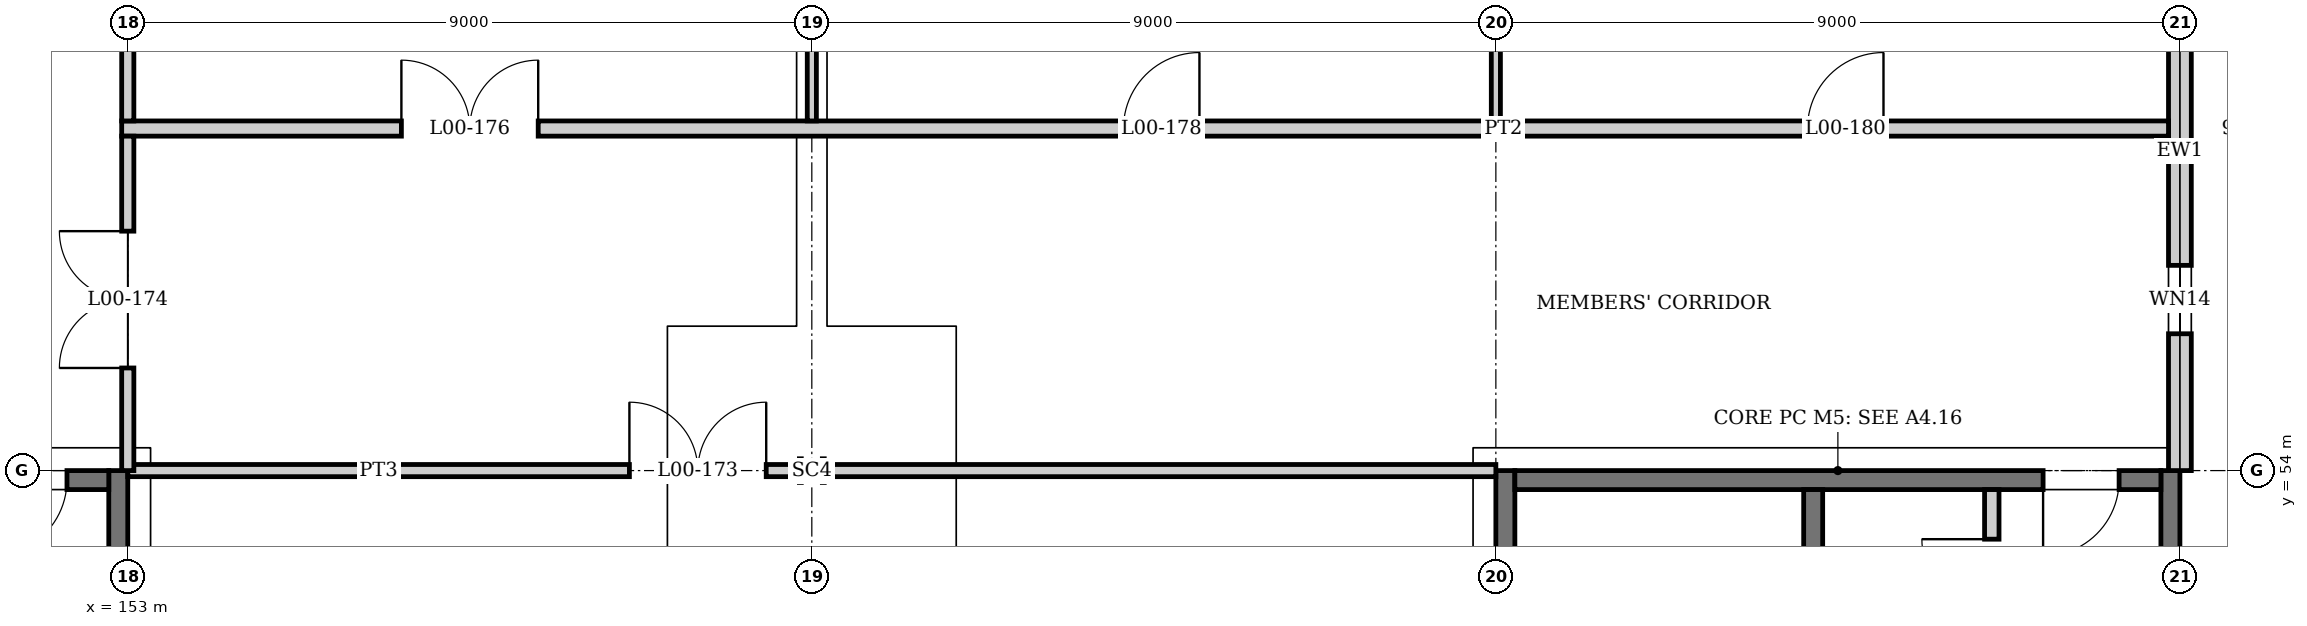
"""IFC4 building model, lengths in metres.
Left out: names, types, materials, properties, quantities, classifications, styles, units other than length and angle.
Written with IfcOpenShell. Run it as: python <this file> out.ifc"""

import sys

from ifc_helpers import new_model, si_unit, direction, frame, frame_2d, origin, origin_2d, place, context, subcontext, project, spatial, rectangle, i_section, extrude, element, fill, save


model = new_model("IFC4")
c1 = context("Model", 3, precision=1e-05, world=origin(), true_north=direction((0.0, 1.0)))
c2 = subcontext(c1, "Body", "Model", "MODEL_VIEW")
j1 = project(units=[si_unit("LENGTHUNIT", "METRE"), si_unit("PLANEANGLEUNIT", "RADIAN")], contexts=[c1])
p1 = place(None, origin())
s1 = spatial("IfcSite", under=j1, at=p1, CompositionType="ELEMENT")
p2 = place(p1, origin())
s2 = spatial("IfcBuilding", under=s1, at=p2, CompositionType="ELEMENT")
p3 = place(p2, origin())
s3 = spatial("IfcBuildingStorey", under=s2, at=p3, CompositionType="ELEMENT", Elevation=0.0)
p4 = place(p3, frame((162.0, 54.0, 0.0), z_axis=(0.0, 0.0, 1.0), x_axis=(0.0, 1.0, 0.0)))
e1 = element("IfcColumn", 1, at=p4, inside=s3, PredefinedType="COLUMN", context=c2, shape_type="SweptSolid", body=[
    extrude(i_section(OverallWidth=0.311, OverallDepth=0.327, WebThickness=0.016, FlangeThickness=0.025, at=origin_2d()), origin(), (0.0, 0.0, 1.0), 6.0),
])
p5 = place(p3, frame((152.875, 45.0, 0.0), z_axis=(0.0, 0.0, 1.0), x_axis=(0.0, 1.0, 0.0)))
e2 = element("IfcWall", 2, at=p5, inside=s3, PredefinedType="SHEAR", context=c2, shape_type="SweptSolid", body=[
    extrude(rectangle(XDim=9.0, YDim=0.25, at=frame_2d((4.5, 0.0))), origin(), (0.0, 0.0, 1.0), 6.0),
])
p6 = place(p3, frame((144.25, 53.875, 0.0), z_axis=(0.0, 0.0, 1.0), x_axis=(1.0, 0.0, 0.0)))
e3 = element("IfcWall", 3, at=p6, inside=s3, PredefinedType="SHEAR", context=c2, shape_type="SweptSolid", body=[
    extrude(rectangle(XDim=8.5, YDim=0.25, at=frame_2d((4.25, 0.0))), origin(), (0.0, 0.0, 1.0), 6.0),
])
p7 = place(p6, frame((6.95, 0.0, 0.0)))
e4 = element("IfcOpeningElement", 4, at=p7, cuts=e3, PredefinedType="OPENING", context=c2, shape_type="SweptSolid", body=[
    extrude(rectangle(XDim=1.0, YDim=2.1, at=frame_2d((0.5, 1.05))), frame((0.0, 0.135, 0.0), z_axis=(0.0, -1.0, 0.0), x_axis=(1.0, 0.0, 0.0)), (0.0, 0.0, 1.0), 0.27),
])
for number, where, z_axis, x_axis in (
    (5, (171.125, 45.0, 0.0), (0.0, 0.0, 1.0), (0.0, 1.0, 0.0)),
    (6, (179.875, 45.0, 0.0), (0.0, 0.0, 1.0), (0.0, 1.0, 0.0)),
):
    element("IfcWall", number, at=place(p3, frame(where, z_axis=z_axis, x_axis=x_axis)), inside=s3, PredefinedType="SHEAR", context=c2, shape_type="SweptSolid", body=[
        extrude(rectangle(XDim=9.0, YDim=0.25, at=frame_2d((4.5, 0.0))), origin(), (0.0, 0.0, 1.0), 6.0),
    ])
p8 = place(p3, frame((171.25, 53.875, 0.0), z_axis=(0.0, 0.0, 1.0), x_axis=(1.0, 0.0, 0.0)))
e7 = element("IfcWall", 7, at=p8, inside=s3, PredefinedType="SHEAR", context=c2, shape_type="SweptSolid", body=[
    extrude(rectangle(XDim=8.5, YDim=0.25, at=frame_2d((4.25, 0.0))), origin(), (0.0, 0.0, 1.0), 6.0),
])
p9 = place(p8, frame((6.95, 0.0, 0.0)))
e8 = element("IfcOpeningElement", 8, at=p9, cuts=e7, PredefinedType="OPENING", context=c2, shape_type="SweptSolid", body=[
    extrude(rectangle(XDim=1.0, YDim=2.1, at=frame_2d((0.5, 1.05))), frame((0.0, 0.135, 0.0), z_axis=(0.0, -1.0, 0.0), x_axis=(1.0, 0.0, 0.0)), (0.0, 0.0, 1.0), 0.27),
])
p10 = place(p3, frame((180.0, 54.0, 0.0), z_axis=(0.0, 0.0, 1.0), x_axis=(0.0, 1.0, 0.0)))
e9 = element("IfcWall", 9, at=p10, inside=s3, PredefinedType="SOLIDWALL", context=c2, shape_type="SweptSolid", body=[
    extrude(rectangle(XDim=8.846, YDim=0.3, at=frame_2d((4.423, 0.0))), origin(), (0.0, 0.0, 1.0), 5.444),
])
p11 = place(p10, frame((1.8, 0.0, 0.6)))
e10 = element("IfcOpeningElement", 10, at=p11, cuts=e9, PredefinedType="OPENING", context=c2, shape_type="SweptSolid", body=[
    extrude(rectangle(XDim=0.9, YDim=2.7, at=frame_2d((0.45, 1.35))), frame((0.0, 0.16, 0.0), z_axis=(0.0, -1.0, 0.0), x_axis=(1.0, 0.0, 0.0)), (0.0, 0.0, 1.0), 0.32),
])
p12 = place(p10, frame((5.7, 0.0, 1.2)))
e11 = element("IfcOpeningElement", 11, at=p12, cuts=e9, PredefinedType="OPENING", context=c2, shape_type="SweptSolid", body=[
    extrude(rectangle(XDim=2.1, YDim=1.2, at=frame_2d((1.05, 0.6))), frame((0.0, 0.16, 0.0), z_axis=(0.0, -1.0, 0.0), x_axis=(1.0, 0.0, 0.0)), (0.0, 0.0, 1.0), 0.32),
])
p13 = place(p3, frame((175.175, 45.25, 0.0), z_axis=(0.0, 0.0, 1.0), x_axis=(0.0, 1.0, 0.0)))
e12 = element("IfcWall", 12, at=p13, inside=s3, PredefinedType="SOLIDWALL", context=c2, shape_type="SweptSolid", body=[
    extrude(rectangle(XDim=8.5, YDim=0.25, at=frame_2d((4.25, 0.0))), origin(), (0.0, 0.0, 1.0), 5.75),
])
p14 = place(p13, frame((0.4, 0.0, 0.0)))
e13 = element("IfcOpeningElement", 13, at=p14, cuts=e12, PredefinedType="OPENING", context=c2, shape_type="SweptSolid", body=[
    extrude(rectangle(XDim=1.0, YDim=2.1, at=frame_2d((0.5, 1.05))), frame((0.0, 0.135, 0.0), z_axis=(0.0, -1.0, 0.0), x_axis=(1.0, 0.0, 0.0)), (0.0, 0.0, 1.0), 0.27),
])
p15 = place(p3, frame((153.0, 54.0, 0.0), z_axis=(0.0, 0.0, 1.0), x_axis=(1.0, 0.0, 0.0)))
e14 = element("IfcWall", 14, at=p15, inside=s3, PredefinedType="PARTITIONING", context=c2, shape_type="SweptSolid", body=[
    extrude(rectangle(XDim=8.836, YDim=0.16, at=frame_2d((4.418, 0.0))), origin(), (0.0, 0.0, 1.0), 5.322),
])
p16 = place(p15, frame((6.6, 0.0, 0.0)))
e15 = element("IfcOpeningElement", 15, at=p16, cuts=e14, PredefinedType="OPENING", context=c2, shape_type="SweptSolid", body=[
    extrude(rectangle(XDim=1.8, YDim=2.1, at=frame_2d((0.9, 1.05))), frame((0.0, 0.09, 0.0), z_axis=(0.0, -1.0, 0.0), x_axis=(1.0, 0.0, 0.0)), (0.0, 0.0, 1.0), 0.18),
])
p17 = place(p3, frame((162.164, 54.0, 0.0), z_axis=(0.0, 0.0, 1.0), x_axis=(1.0, 0.0, 0.0)))
e16 = element("IfcWall", 16, at=p17, inside=s3, PredefinedType="PARTITIONING", context=c2, shape_type="SweptSolid", body=[
    extrude(rectangle(XDim=8.836, YDim=0.16, at=frame_2d((4.418, 0.0))), origin(), (0.0, 0.0, 1.0), 5.322),
])
p18 = place(p3, frame((152.92, 58.5, 0.0), z_axis=(0.0, 0.0, 1.0), x_axis=(1.0, 0.0, 0.0)))
e17 = element("IfcWall", 17, at=p18, inside=s3, PredefinedType="PARTITIONING", context=c2, shape_type="SweptSolid", body=[
    extrude(rectangle(XDim=26.93, YDim=0.2, at=frame_2d((13.465, 0.0))), origin(), (0.0, 0.0, 1.0), 5.447),
])
p19 = place(p18, frame((3.68, 0.0, 0.0)))
e18 = element("IfcOpeningElement", 18, at=p19, cuts=e17, PredefinedType="OPENING", context=c2, shape_type="SweptSolid", body=[
    extrude(rectangle(XDim=1.8, YDim=2.1, at=frame_2d((0.9, 1.05))), frame((0.0, 0.11, 0.0), z_axis=(0.0, -1.0, 0.0), x_axis=(1.0, 0.0, 0.0)), (0.0, 0.0, 1.0), 0.22),
])
p20 = place(p18, frame((13.18, 0.0, 0.0)))
e19 = element("IfcOpeningElement", 19, at=p20, cuts=e17, PredefinedType="OPENING", context=c2, shape_type="SweptSolid", body=[
    extrude(rectangle(XDim=1.0, YDim=2.1, at=frame_2d((0.5, 1.05))), frame((0.0, 0.11, 0.0), z_axis=(0.0, -1.0, 0.0), x_axis=(1.0, 0.0, 0.0)), (0.0, 0.0, 1.0), 0.22),
])
p21 = place(p18, frame((22.18, 0.0, 0.0)))
e20 = element("IfcOpeningElement", 20, at=p21, cuts=e17, PredefinedType="OPENING", context=c2, shape_type="SweptSolid", body=[
    extrude(rectangle(XDim=1.0, YDim=2.1, at=frame_2d((0.5, 1.05))), frame((0.0, 0.11, 0.0), z_axis=(0.0, -1.0, 0.0), x_axis=(1.0, 0.0, 0.0)), (0.0, 0.0, 1.0), 0.22),
])
p22 = place(p3, frame((153.0, 54.0, 0.0), z_axis=(0.0, 0.0, 1.0), x_axis=(0.0, 1.0, 0.0)))
e21 = element("IfcWall", 21, at=p22, inside=s3, PredefinedType="PARTITIONING", context=c2, shape_type="SweptSolid", body=[
    extrude(rectangle(XDim=4.4, YDim=0.16, at=frame_2d((2.2, 0.0))), origin(), (0.0, 0.0, 1.0), 5.322),
])
p23 = place(p22, frame((1.35, 0.0, 0.0)))
e22 = element("IfcOpeningElement", 22, at=p23, cuts=e21, PredefinedType="OPENING", context=c2, shape_type="SweptSolid", body=[
    extrude(rectangle(XDim=1.8, YDim=2.1, at=frame_2d((0.9, 1.05))), frame((0.0, 0.09, 0.0), z_axis=(0.0, -1.0, 0.0), x_axis=(1.0, 0.0, 0.0)), (0.0, 0.0, 1.0), 0.18),
])
p24 = place(p3, frame((153.0, 58.6, 0.0), z_axis=(0.0, 0.0, 1.0), x_axis=(0.0, 1.0, 0.0)))
e23 = element("IfcWall", 23, at=p24, inside=s3, PredefinedType="PARTITIONING", context=c2, shape_type="SweptSolid", body=[
    extrude(rectangle(XDim=4.236, YDim=0.16, at=frame_2d((2.118, 0.0))), origin(), (0.0, 0.0, 1.0), 5.447),
])
for number, where, z_axis, x_axis in (
    (24, (162.0, 58.6, 0.0), (0.0, 0.0, 1.0), (0.0, 1.0, 0.0)),
    (25, (171.0, 58.6, 0.0), (0.0, 0.0, 1.0), (0.0, 1.0, 0.0)),
):
    element("IfcWall", number, at=place(p3, frame(where, z_axis=z_axis, x_axis=x_axis)), inside=s3, PredefinedType="PARTITIONING", context=c2, shape_type="SweptSolid", body=[
        extrude(rectangle(XDim=4.236, YDim=0.12, at=frame_2d((2.118, 0.0))), origin(), (0.0, 0.0, 1.0), 5.447),
    ])
p25 = place(p3, frame((177.525, 51.4, 0.0), z_axis=(0.0, 0.0, 1.0), x_axis=(0.0, 1.0, 0.0)))
e26 = element("IfcWall", 26, at=p25, inside=s3, PredefinedType="PARTITIONING", context=c2, shape_type="SweptSolid", body=[
    extrude(rectangle(XDim=2.35, YDim=0.19, at=frame_2d((1.175, 0.0))), origin(), (0.0, 0.0, 1.0), 5.75),
])
p26 = place(p25, frame((0.778, 0.0, 0.0)))
e27 = element("IfcOpeningElement", 27, at=p26, cuts=e26, PredefinedType="OPENING", context=c2, shape_type="SweptSolid", body=[
    extrude(rectangle(XDim=0.92, YDim=2.1, at=frame_2d((0.46, 1.05))), frame((0.0, 0.105, 0.0), z_axis=(0.0, -1.0, 0.0), x_axis=(1.0, 0.0, 0.0)), (0.0, 0.0, 1.0), 0.21),
])
p27 = place(p11, origin())
e28 = element("IfcWindow", 28, at=p27, inside=s3, PartitioningType="SINGLE_PANEL", PredefinedType="WINDOW", context=c2, shape_type="SweptSolid", body=[
    extrude(rectangle(XDim=0.9, YDim=2.7, at=frame_2d((0.45, 1.35))), frame((0.0, 0.03, 0.0), z_axis=(0.0, -1.0, 0.0), x_axis=(1.0, 0.0, 0.0)), (0.0, 0.0, 1.0), 0.06),
])
fill(e10, e28)
p28 = place(p7, frame((1.0, 0.0, 0.0), z_axis=(0.0, 0.0, 1.0), x_axis=(-1.0, 0.0, 0.0)))
e29 = element("IfcDoor", 29, at=p28, inside=s3, OperationType="SINGLE_SWING_RIGHT", PredefinedType="DOOR", context=c2, shape_type="SweptSolid", body=[
    extrude(rectangle(XDim=1.0, YDim=2.1, at=frame_2d((0.5, 1.05))), frame((0.0, 0.025, 0.0), z_axis=(0.0, -1.0, 0.0), x_axis=(1.0, 0.0, 0.0)), (0.0, 0.0, 1.0), 0.05),
])
fill(e4, e29)
p29 = place(p9, frame((1.0, 0.0, 0.0), z_axis=(0.0, 0.0, 1.0), x_axis=(-1.0, 0.0, 0.0)))
e30 = element("IfcDoor", 30, at=p29, inside=s3, OperationType="SINGLE_SWING_RIGHT", PredefinedType="DOOR", context=c2, shape_type="SweptSolid", body=[
    extrude(rectangle(XDim=1.0, YDim=2.1, at=frame_2d((0.5, 1.05))), frame((0.0, 0.025, 0.0), z_axis=(0.0, -1.0, 0.0), x_axis=(1.0, 0.0, 0.0)), (0.0, 0.0, 1.0), 0.05),
])
fill(e8, e30)
p30 = place(p26, origin())
e31 = element("IfcDoor", 31, at=p30, inside=s3, OperationType="SINGLE_SWING_RIGHT", PredefinedType="DOOR", context=c2, shape_type="SweptSolid", body=[
    extrude(rectangle(XDim=0.92, YDim=2.1, at=frame_2d((0.46, 1.05))), frame((0.0, 0.025, 0.0), z_axis=(0.0, -1.0, 0.0), x_axis=(1.0, 0.0, 0.0)), (0.0, 0.0, 1.0), 0.05),
])
fill(e27, e31)
p31 = place(p16, origin())
e32 = element("IfcDoor", 32, at=p31, inside=s3, OperationType="DOUBLE_DOOR_SINGLE_SWING", PredefinedType="DOOR", context=c2, shape_type="SweptSolid", body=[
    extrude(rectangle(XDim=1.8, YDim=2.1, at=frame_2d((0.9, 1.05))), frame((0.0, 0.025, 0.0), z_axis=(0.0, -1.0, 0.0), x_axis=(1.0, 0.0, 0.0)), (0.0, 0.0, 1.0), 0.05),
])
fill(e15, e32)
p32 = place(p23, origin())
e33 = element("IfcDoor", 33, at=p32, inside=s3, OperationType="DOUBLE_DOOR_SINGLE_SWING", PredefinedType="DOOR", context=c2, shape_type="SweptSolid", body=[
    extrude(rectangle(XDim=1.8, YDim=2.1, at=frame_2d((0.9, 1.05))), frame((0.0, 0.025, 0.0), z_axis=(0.0, -1.0, 0.0), x_axis=(1.0, 0.0, 0.0)), (0.0, 0.0, 1.0), 0.05),
])
fill(e22, e33)
p33 = place(p19, origin())
e34 = element("IfcDoor", 34, at=p33, inside=s3, OperationType="DOUBLE_DOOR_SINGLE_SWING", PredefinedType="DOOR", context=c2, shape_type="SweptSolid", body=[
    extrude(rectangle(XDim=1.8, YDim=2.1, at=frame_2d((0.9, 1.05))), frame((0.0, 0.025, 0.0), z_axis=(0.0, -1.0, 0.0), x_axis=(1.0, 0.0, 0.0)), (0.0, 0.0, 1.0), 0.05),
])
fill(e18, e34)
p34 = place(p20, origin())
e35 = element("IfcDoor", 35, at=p34, inside=s3, OperationType="SINGLE_SWING_RIGHT", PredefinedType="DOOR", context=c2, shape_type="SweptSolid", body=[
    extrude(rectangle(XDim=1.0, YDim=2.1, at=frame_2d((0.5, 1.05))), frame((0.0, 0.025, 0.0), z_axis=(0.0, -1.0, 0.0), x_axis=(1.0, 0.0, 0.0)), (0.0, 0.0, 1.0), 0.05),
])
fill(e19, e35)
p35 = place(p21, origin())
e36 = element("IfcDoor", 36, at=p35, inside=s3, OperationType="SINGLE_SWING_RIGHT", PredefinedType="DOOR", context=c2, shape_type="SweptSolid", body=[
    extrude(rectangle(XDim=1.0, YDim=2.1, at=frame_2d((0.5, 1.05))), frame((0.0, 0.025, 0.0), z_axis=(0.0, -1.0, 0.0), x_axis=(1.0, 0.0, 0.0)), (0.0, 0.0, 1.0), 0.05),
])
fill(e20, e36)
save(model, sys.argv[1])
